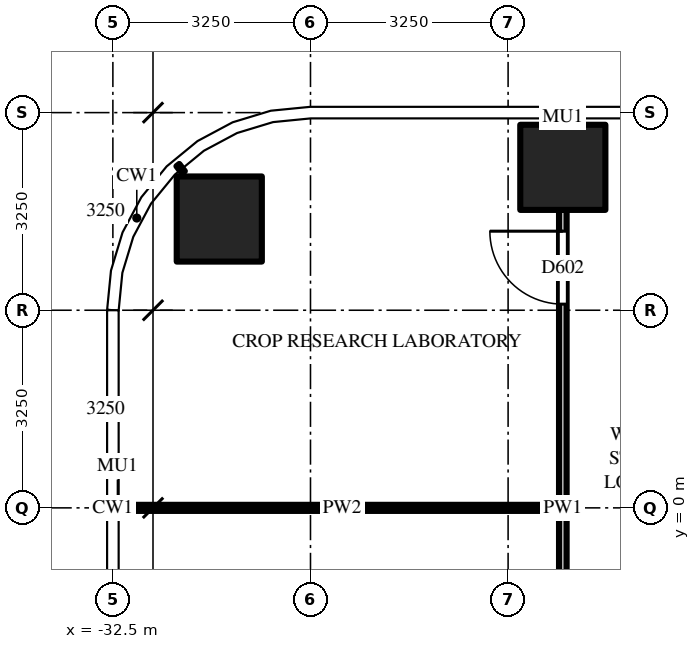
"""IFC4 building model, lengths in metres.
Left out: names, types, materials, properties, quantities, classifications, styles, units other than length and angle.
Written with IfcOpenShell. Run it as: python <this file> out.ifc"""

import sys

from ifc_helpers import new_model, si_unit, direction, frame, frame_2d, origin, origin_2d, place, context, subcontext, project, spatial, rectangle, extrude, source, transform, mapped, element, fill, save


model = new_model("IFC4")
c1 = context("Model", 3, precision=1e-05, world=origin(), true_north=direction((0.0, 1.0)))
c2 = subcontext(c1, "Body", "Model", "MODEL_VIEW")
j1 = project(units=[si_unit("LENGTHUNIT", "METRE"), si_unit("PLANEANGLEUNIT", "RADIAN")], contexts=[c1])
p1 = place(None, origin())
s1 = spatial("IfcSite", under=j1, at=p1, CompositionType="ELEMENT")
p2 = place(p1, origin())
s2 = spatial("IfcBuilding", under=s1, at=p2, CompositionType="ELEMENT")
p3 = place(p2, frame((0.0, 0.0, 74.5)))
s3 = spatial("IfcBuildingStorey", under=s2, at=p3, CompositionType="ELEMENT", Elevation=74.5)
m1 = source(origin(), c2, "Body", "SweptSolid", [
    extrude(rectangle(XDim=1.4, YDim=1.4, at=origin_2d()), origin(), (0.0, 0.0, 1.0), 4.5),
])
for number, where, z_axis, x_axis in (
    (1, (-25.1, 5.6, 0.0), (0.0, 0.0, 1.0), (1.0, 0.0, 0.0)),
    (2, (-30.75, 4.75, 0.0), (0.0, 0.0, 1.0), (1.0, 0.0, 0.0)),
):
    element("IfcColumn", number, at=place(p3, frame(where, z_axis=z_axis, x_axis=x_axis)), inside=s3, PredefinedType="COLUMN", context=c2, shape_type="MappedRepresentation", body=[
        mapped(m1, transform((0.0, 0.0, 0.0))),
    ])
m2 = source(origin(), c2, "Body", "SweptSolid", [
    extrude(rectangle(XDim=9.8, YDim=0.125, at=frame_2d((4.9, 0.0))), origin(), (0.0, 0.0, 1.0), 3.468),
])
p4 = place(p3, frame((-25.1, -4.9, 0.0), z_axis=(0.0, 0.0, 1.0), x_axis=(0.0, 1.0, 0.0)))
e3 = element("IfcWall", 3, at=p4, inside=s3, PredefinedType="PARTITIONING", context=c2, shape_type="MappedRepresentation", body=[
    mapped(m2, transform((0.0, 0.0, 0.0))),
])
m3 = source(origin(), c2, "Body", "SweptSolid", [
    extrude(rectangle(XDim=1.0, YDim=2.1, at=frame_2d((0.5, 1.05))), frame((0.0, 0.073, 0.0), z_axis=(0.0, -1.0, 0.0), x_axis=(1.0, 0.0, 0.0)), (0.0, 0.0, 1.0), 0.145),
])
p5 = place(p4, frame((0.35, 0.0, 0.0)))
e4 = element("IfcOpeningElement", 4, at=p5, cuts=e3, PredefinedType="OPENING", context=c2, shape_type="MappedRepresentation", body=[
    mapped(m3, transform((0.0, 0.0, 0.0))),
])
m4 = source(origin(), c2, "Body", "SweptSolid", [
    extrude(rectangle(XDim=1.2, YDim=2.1, at=frame_2d((0.6, 1.05))), frame((0.0, 0.073, 0.0), z_axis=(0.0, -1.0, 0.0), x_axis=(1.0, 0.0, 0.0)), (0.0, 0.0, 1.0), 0.145),
])
p6 = place(p4, frame((8.25, 0.0, 0.0)))
e5 = element("IfcOpeningElement", 5, at=p6, cuts=e3, PredefinedType="OPENING", context=c2, shape_type="MappedRepresentation", body=[
    mapped(m4, transform((0.0, 0.0, 0.0))),
])
m5 = source(origin(), c2, "Body", "SweptSolid", [
    extrude(rectangle(XDim=7.137, YDim=0.1, at=frame_2d((3.569, 0.0))), origin(), (0.0, 0.0, 1.0), 3.33),
])
p7 = place(p3, frame((-32.3, 0.0, 0.0), z_axis=(0.0, 0.0, 1.0), x_axis=(1.0, 0.0, 0.0)))
e6 = element("IfcWall", 6, at=p7, inside=s3, PredefinedType="PARTITIONING", context=c2, shape_type="MappedRepresentation", body=[
    mapped(m5, transform((0.0, 0.0, 0.0))),
])
m6 = source(origin(), c2, "Body", "SweptSolid", [
    extrude(rectangle(XDim=1.2, YDim=2.1, at=frame_2d((0.6, 1.05))), frame((0.0, 0.025, 0.0), z_axis=(0.0, -1.0, 0.0), x_axis=(1.0, 0.0, 0.0)), (0.0, 0.0, 1.0), 0.05),
])
p8 = place(p6, origin())
e7 = element("IfcDoor", 7, at=p8, inside=s3, OperationType="SINGLE_SWING_RIGHT", PredefinedType="DOOR", context=c2, shape_type="MappedRepresentation", body=[
    mapped(m6, transform((0.0, 0.0, 0.0))),
])
fill(e5, e7)
save(model, sys.argv[1])
